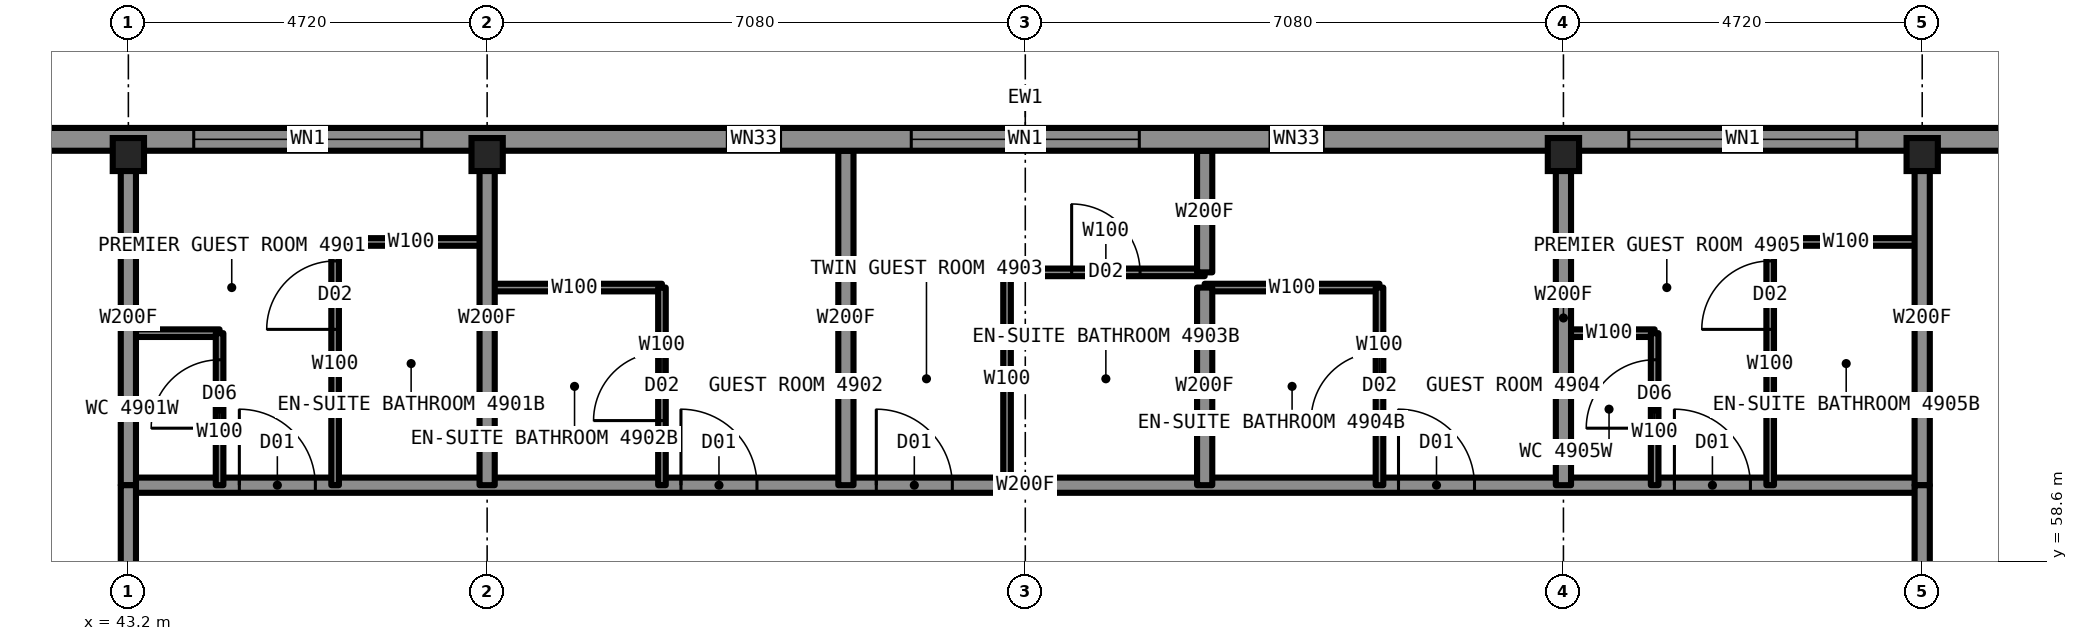
"""IFC4 building model, lengths in metres.
Left out: names, types, materials, properties, quantities, classifications, styles, units other than length and angle.
Written with IfcOpenShell. Run it as: python <this file> out.ifc"""

import sys

from ifc_helpers import new_model, si_unit, direction, frame, frame_2d, origin, origin_2d, place, context, subcontext, project, spatial, rectangle, i_section, extrude, element, fill, save


model = new_model("IFC4")
c1 = context("Model", 3, precision=1e-05, world=origin(), true_north=direction((0.0, 1.0)))
c2 = subcontext(c1, "Body", "Model", "MODEL_VIEW")
j1 = project(units=[si_unit("LENGTHUNIT", "METRE"), si_unit("PLANEANGLEUNIT", "RADIAN")], contexts=[c1])
p1 = place(None, origin())
s1 = spatial("IfcSite", under=j1, at=p1, CompositionType="ELEMENT")
p2 = place(p1, origin())
s2 = spatial("IfcBuilding", under=s1, at=p2, CompositionType="ELEMENT")
p3 = place(p2, frame((0.0, 0.0, 182.8)))
s3 = spatial("IfcBuildingStorey", under=s2, at=p3, CompositionType="ELEMENT", Elevation=182.8)
for number, where, z_axis, x_axis in (
    (1, (43.2, 63.95, 0.0), (0.0, 0.0, 1.0), (1.0, 0.0, 0.0)),
    (2, (47.92, 63.95, 0.0), (0.0, 0.0, 1.0), (1.0, 0.0, 0.0)),
    (3, (62.08, 63.95, 0.0), (0.0, 0.0, 1.0), (1.0, 0.0, 0.0)),
    (4, (66.8, 63.95, 0.0), (0.0, 0.0, 1.0), (1.0, 0.0, 0.0)),
):
    element("IfcColumn", number, at=place(p3, frame(where, z_axis=z_axis, x_axis=x_axis)), inside=s3, PredefinedType="COLUMN", context=c2, shape_type="SweptSolid", body=[
        extrude(i_section(OverallWidth=0.411, OverallDepth=0.434, WebThickness=0.036, FlangeThickness=0.057, at=origin_2d()), origin(), (0.0, 0.0, 1.0), 3.5),
    ])
p4 = place(p3, frame((43.2, 59.6, 0.0), z_axis=(0.0, 0.0, 1.0), x_axis=(1.0, 0.0, 0.0)))
e5 = element("IfcWall", 5, at=p4, inside=s3, PredefinedType="PARTITIONING", context=c2, shape_type="SweptSolid", body=[
    extrude(rectangle(XDim=23.6, YDim=0.2, at=frame_2d((11.8, 0.0))), origin(), (0.0, 0.0, 1.0), 3.33),
])
p5 = place(p4, frame((1.46, 0.0, 0.0)))
e6 = element("IfcOpeningElement", 6, at=p5, cuts=e5, PredefinedType="OPENING", context=c2, shape_type="SweptSolid", body=[
    extrude(rectangle(XDim=1.0, YDim=2.2, at=frame_2d((0.5, 1.1))), frame((0.0, 0.11, 0.0), z_axis=(0.0, -1.0, 0.0), x_axis=(1.0, 0.0, 0.0)), (0.0, 0.0, 1.0), 0.22),
])
p6 = place(p4, frame((7.27, 0.0, 0.0)))
e7 = element("IfcOpeningElement", 7, at=p6, cuts=e5, PredefinedType="OPENING", context=c2, shape_type="SweptSolid", body=[
    extrude(rectangle(XDim=1.0, YDim=2.2, at=frame_2d((0.5, 1.1))), frame((0.0, 0.11, 0.0), z_axis=(0.0, -1.0, 0.0), x_axis=(1.0, 0.0, 0.0)), (0.0, 0.0, 1.0), 0.22),
])
p7 = place(p4, frame((9.84, 0.0, 0.0)))
e8 = element("IfcOpeningElement", 8, at=p7, cuts=e5, PredefinedType="OPENING", context=c2, shape_type="SweptSolid", body=[
    extrude(rectangle(XDim=1.0, YDim=2.2, at=frame_2d((0.5, 1.1))), frame((0.0, 0.11, 0.0), z_axis=(0.0, -1.0, 0.0), x_axis=(1.0, 0.0, 0.0)), (0.0, 0.0, 1.0), 0.22),
])
p8 = place(p4, frame((16.71, 0.0, 0.0)))
e9 = element("IfcOpeningElement", 9, at=p8, cuts=e5, PredefinedType="OPENING", context=c2, shape_type="SweptSolid", body=[
    extrude(rectangle(XDim=1.0, YDim=2.2, at=frame_2d((0.5, 1.1))), frame((0.0, 0.11, 0.0), z_axis=(0.0, -1.0, 0.0), x_axis=(1.0, 0.0, 0.0)), (0.0, 0.0, 1.0), 0.22),
])
p9 = place(p4, frame((20.34, 0.0, 0.0)))
e10 = element("IfcOpeningElement", 10, at=p9, cuts=e5, PredefinedType="OPENING", context=c2, shape_type="SweptSolid", body=[
    extrude(rectangle(XDim=1.0, YDim=2.2, at=frame_2d((0.5, 1.1))), frame((0.0, 0.11, 0.0), z_axis=(0.0, -1.0, 0.0), x_axis=(1.0, 0.0, 0.0)), (0.0, 0.0, 1.0), 0.22),
])
for number, where, z_axis, x_axis in (
    (11, (43.2, 61.6, 0.0), (0.0, 0.0, 1.0), (1.0, 0.0, 0.0)),
    (12, (62.08, 61.6, 0.0), (0.0, 0.0, 1.0), (1.0, 0.0, 0.0)),
):
    element("IfcWall", number, at=place(p3, frame(where, z_axis=z_axis, x_axis=x_axis)), inside=s3, PredefinedType="PARTITIONING", context=c2, shape_type="SweptSolid", body=[
        extrude(rectangle(XDim=1.2, YDim=0.1, at=frame_2d((0.6, 0.0))), origin(), (0.0, 0.0, 1.0), 3.33),
    ])
p10 = place(p3, frame((47.92, 62.2, 0.0), z_axis=(0.0, 0.0, 1.0), x_axis=(1.0, 0.0, 0.0)))
e13 = element("IfcWall", 13, at=p10, inside=s3, PredefinedType="PARTITIONING", context=c2, shape_type="SweptSolid", body=[
    extrude(rectangle(XDim=2.3, YDim=0.1, at=frame_2d((1.15, 0.0))), origin(), (0.0, 0.0, 1.0), 3.33),
])
p11 = place(p3, frame((57.36, 62.2, 0.0), z_axis=(0.0, 0.0, 1.0), x_axis=(1.0, 0.0, 0.0)))
e14 = element("IfcWall", 14, at=p11, inside=s3, PredefinedType="PARTITIONING", context=c2, shape_type="SweptSolid", body=[
    extrude(rectangle(XDim=2.3, YDim=0.1, at=frame_2d((1.15, 0.0))), origin(), (0.0, 0.0, 1.0), 3.33),
])
p12 = place(p3, frame((54.76, 62.4, 0.0), z_axis=(0.0, 0.0, 1.0), x_axis=(1.0, 0.0, 0.0)))
e15 = element("IfcWall", 15, at=p12, inside=s3, PredefinedType="PARTITIONING", context=c2, shape_type="SweptSolid", body=[
    extrude(rectangle(XDim=2.6, YDim=0.1, at=frame_2d((1.3, 0.0))), origin(), (0.0, 0.0, 1.0), 3.33),
])
p13 = place(p12, frame((0.85, 0.0, 0.0)))
e16 = element("IfcOpeningElement", 16, at=p13, cuts=e15, PredefinedType="OPENING", context=c2, shape_type="SweptSolid", body=[
    extrude(rectangle(XDim=0.9, YDim=2.1, at=frame_2d((0.45, 1.05))), frame((0.0, 0.06, 0.0), z_axis=(0.0, -1.0, 0.0), x_axis=(1.0, 0.0, 0.0)), (0.0, 0.0, 1.0), 0.12),
])
for number, where, z_axis, x_axis in (
    (17, (45.92, 62.8, 0.0), (0.0, 0.0, 1.0), (1.0, 0.0, 0.0)),
    (18, (64.8, 62.8, 0.0), (0.0, 0.0, 1.0), (1.0, 0.0, 0.0)),
):
    element("IfcWall", number, at=place(p3, frame(where, z_axis=z_axis, x_axis=x_axis)), inside=s3, PredefinedType="PARTITIONING", context=c2, shape_type="SweptSolid", body=[
        extrude(rectangle(XDim=2.0, YDim=0.1, at=frame_2d((1.0, 0.0))), origin(), (0.0, 0.0, 1.0), 3.33),
    ])
p14 = place(p3, frame((54.76, 59.6, 0.0), z_axis=(0.0, 0.0, 1.0), x_axis=(0.0, 1.0, 0.0)))
e19 = element("IfcWall", 19, at=p14, inside=s3, PredefinedType="PARTITIONING", context=c2, shape_type="SweptSolid", body=[
    extrude(rectangle(XDim=2.8, YDim=0.1, at=frame_2d((1.4, 0.0))), origin(), (0.0, 0.0, 1.0), 3.33),
])
p15 = place(p3, frame((44.4, 59.6, 0.0), z_axis=(0.0, 0.0, 1.0), x_axis=(0.0, 1.0, 0.0)))
e20 = element("IfcWall", 20, at=p15, inside=s3, PredefinedType="PARTITIONING", context=c2, shape_type="SweptSolid", body=[
    extrude(rectangle(XDim=2.0, YDim=0.1, at=frame_2d((1.0, 0.0))), origin(), (0.0, 0.0, 1.0), 3.33),
])
p16 = place(p15, frame((0.75, 0.0, 0.0)))
e21 = element("IfcOpeningElement", 21, at=p16, cuts=e20, PredefinedType="OPENING", context=c2, shape_type="SweptSolid", body=[
    extrude(rectangle(XDim=0.9, YDim=2.1, at=frame_2d((0.45, 1.05))), frame((0.0, 0.06, 0.0), z_axis=(0.0, -1.0, 0.0), x_axis=(1.0, 0.0, 0.0)), (0.0, 0.0, 1.0), 0.12),
])
p17 = place(p3, frame((43.2, 59.6, 0.0), z_axis=(0.0, 0.0, 1.0), x_axis=(0.0, 1.0, 0.0)))
e22 = element("IfcWall", 22, at=p17, inside=s3, PredefinedType="PARTITIONING", context=c2, shape_type="SweptSolid", body=[
    extrude(rectangle(XDim=4.4, YDim=0.2, at=frame_2d((2.2, 0.0))), origin(), (0.0, 0.0, 1.0), 2.573),
])
p18 = place(p3, frame((52.64, 59.6, 0.0), z_axis=(0.0, 0.0, 1.0), x_axis=(0.0, 1.0, 0.0)))
e23 = element("IfcWall", 23, at=p18, inside=s3, PredefinedType="PARTITIONING", context=c2, shape_type="SweptSolid", body=[
    extrude(rectangle(XDim=4.4, YDim=0.2, at=frame_2d((2.2, 0.0))), origin(), (0.0, 0.0, 1.0), 3.33),
])
p19 = place(p3, frame((50.22, 59.6, 0.0), z_axis=(0.0, 0.0, 1.0), x_axis=(0.0, 1.0, 0.0)))
e24 = element("IfcWall", 24, at=p19, inside=s3, PredefinedType="PARTITIONING", context=c2, shape_type="SweptSolid", body=[
    extrude(rectangle(XDim=2.6, YDim=0.1, at=frame_2d((1.3, 0.0))), origin(), (0.0, 0.0, 1.0), 3.33),
])
p20 = place(p19, frame((0.85, 0.0, 0.0)))
e25 = element("IfcOpeningElement", 25, at=p20, cuts=e24, PredefinedType="OPENING", context=c2, shape_type="SweptSolid", body=[
    extrude(rectangle(XDim=0.9, YDim=2.1, at=frame_2d((0.45, 1.05))), frame((0.0, 0.06, 0.0), z_axis=(0.0, -1.0, 0.0), x_axis=(1.0, 0.0, 0.0)), (0.0, 0.0, 1.0), 0.12),
])
p21 = place(p3, frame((47.92, 59.6, 0.0), z_axis=(0.0, 0.0, 1.0), x_axis=(0.0, 1.0, 0.0)))
e26 = element("IfcWall", 26, at=p21, inside=s3, PredefinedType="PARTITIONING", context=c2, shape_type="SweptSolid", body=[
    extrude(rectangle(XDim=4.4, YDim=0.2, at=frame_2d((2.2, 0.0))), origin(), (0.0, 0.0, 1.0), 2.573),
])
p22 = place(p3, frame((45.92, 59.6, 0.0), z_axis=(0.0, 0.0, 1.0), x_axis=(0.0, 1.0, 0.0)))
e27 = element("IfcWall", 27, at=p22, inside=s3, PredefinedType="PARTITIONING", context=c2, shape_type="SweptSolid", body=[
    extrude(rectangle(XDim=3.2, YDim=0.1, at=frame_2d((1.6, 0.0))), origin(), (0.0, 0.0, 1.0), 3.33),
])
p23 = place(p22, frame((2.05, 0.0, 0.0)))
e28 = element("IfcOpeningElement", 28, at=p23, cuts=e27, PredefinedType="OPENING", context=c2, shape_type="SweptSolid", body=[
    extrude(rectangle(XDim=0.9, YDim=2.1, at=frame_2d((0.45, 1.05))), frame((0.0, 0.06, 0.0), z_axis=(0.0, -1.0, 0.0), x_axis=(1.0, 0.0, 0.0)), (0.0, 0.0, 1.0), 0.12),
])
p24 = place(p3, frame((66.8, 59.6, 0.0), z_axis=(0.0, 0.0, 1.0), x_axis=(0.0, 1.0, 0.0)))
e29 = element("IfcWall", 29, at=p24, inside=s3, PredefinedType="PARTITIONING", context=c2, shape_type="SweptSolid", body=[
    extrude(rectangle(XDim=4.4, YDim=0.2, at=frame_2d((2.2, 0.0))), origin(), (0.0, 0.0, 1.0), 2.573),
])
p25 = place(p3, frame((57.36, 59.6, 0.0), z_axis=(0.0, 0.0, 1.0), x_axis=(0.0, 1.0, 0.0)))
e30 = element("IfcWall", 30, at=p25, inside=s3, PredefinedType="PARTITIONING", context=c2, shape_type="SweptSolid", body=[
    extrude(rectangle(XDim=2.6, YDim=0.2, at=frame_2d((1.3, 0.0))), origin(), (0.0, 0.0, 1.0), 3.33),
])
p26 = place(p3, frame((57.36, 62.4, 0.0), z_axis=(0.0, 0.0, 1.0), x_axis=(0.0, 1.0, 0.0)))
e31 = element("IfcWall", 31, at=p26, inside=s3, PredefinedType="PARTITIONING", context=c2, shape_type="SweptSolid", body=[
    extrude(rectangle(XDim=1.6, YDim=0.2, at=frame_2d((0.8, 0.0))), origin(), (0.0, 0.0, 1.0), 3.33),
])
p27 = place(p3, frame((59.66, 59.6, 0.0), z_axis=(0.0, 0.0, 1.0), x_axis=(0.0, 1.0, 0.0)))
e32 = element("IfcWall", 32, at=p27, inside=s3, PredefinedType="PARTITIONING", context=c2, shape_type="SweptSolid", body=[
    extrude(rectangle(XDim=2.6, YDim=0.1, at=frame_2d((1.3, 0.0))), origin(), (0.0, 0.0, 1.0), 3.33),
])
p28 = place(p27, frame((0.85, 0.0, 0.0)))
e33 = element("IfcOpeningElement", 33, at=p28, cuts=e32, PredefinedType="OPENING", context=c2, shape_type="SweptSolid", body=[
    extrude(rectangle(XDim=0.9, YDim=2.1, at=frame_2d((0.45, 1.05))), frame((0.0, 0.06, 0.0), z_axis=(0.0, -1.0, 0.0), x_axis=(1.0, 0.0, 0.0)), (0.0, 0.0, 1.0), 0.12),
])
p29 = place(p3, frame((62.08, 59.6, 0.0), z_axis=(0.0, 0.0, 1.0), x_axis=(0.0, 1.0, 0.0)))
e34 = element("IfcWall", 34, at=p29, inside=s3, PredefinedType="PARTITIONING", context=c2, shape_type="SweptSolid", body=[
    extrude(rectangle(XDim=4.4, YDim=0.2, at=frame_2d((2.2, 0.0))), origin(), (0.0, 0.0, 1.0), 2.573),
])
p30 = place(p3, frame((63.28, 59.6, 0.0), z_axis=(0.0, 0.0, 1.0), x_axis=(0.0, 1.0, 0.0)))
e35 = element("IfcWall", 35, at=p30, inside=s3, PredefinedType="PARTITIONING", context=c2, shape_type="SweptSolid", body=[
    extrude(rectangle(XDim=2.0, YDim=0.1, at=frame_2d((1.0, 0.0))), origin(), (0.0, 0.0, 1.0), 3.33),
])
p31 = place(p30, frame((0.75, 0.0, 0.0)))
e36 = element("IfcOpeningElement", 36, at=p31, cuts=e35, PredefinedType="OPENING", context=c2, shape_type="SweptSolid", body=[
    extrude(rectangle(XDim=0.9, YDim=2.1, at=frame_2d((0.45, 1.05))), frame((0.0, 0.06, 0.0), z_axis=(0.0, -1.0, 0.0), x_axis=(1.0, 0.0, 0.0)), (0.0, 0.0, 1.0), 0.12),
])
p32 = place(p3, frame((64.8, 59.6, 0.0), z_axis=(0.0, 0.0, 1.0), x_axis=(0.0, 1.0, 0.0)))
e37 = element("IfcWall", 37, at=p32, inside=s3, PredefinedType="PARTITIONING", context=c2, shape_type="SweptSolid", body=[
    extrude(rectangle(XDim=3.2, YDim=0.1, at=frame_2d((1.6, 0.0))), origin(), (0.0, 0.0, 1.0), 3.33),
])
p33 = place(p32, frame((2.05, 0.0, 0.0)))
e38 = element("IfcOpeningElement", 38, at=p33, cuts=e37, PredefinedType="OPENING", context=c2, shape_type="SweptSolid", body=[
    extrude(rectangle(XDim=0.9, YDim=2.1, at=frame_2d((0.45, 1.05))), frame((0.0, 0.06, 0.0), z_axis=(0.0, -1.0, 0.0), x_axis=(1.0, 0.0, 0.0)), (0.0, 0.0, 1.0), 0.12),
])
p34 = place(p3, frame((68.8, 64.15, 0.0), z_axis=(0.0, 0.0, 1.0), x_axis=(-1.0, 0.0, 0.0)))
e39 = element("IfcWall", 39, at=p34, inside=s3, PredefinedType="SOLIDWALL", context=c2, shape_type="SweptSolid", body=[
    extrude(rectangle(XDim=27.6, YDim=0.3, at=frame_2d((13.8, 0.0))), origin(), (0.0, 0.0, 1.0), 2.83),
])
p35 = place(p34, frame((2.86, 0.0, 0.3)))
e40 = element("IfcOpeningElement", 40, at=p35, cuts=e39, PredefinedType="OPENING", context=c2, shape_type="SweptSolid", body=[
    extrude(rectangle(XDim=3.0, YDim=2.0, at=frame_2d((1.5, 1.0))), frame((0.0, 0.16, 0.0), z_axis=(0.0, -1.0, 0.0), x_axis=(1.0, 0.0, 0.0)), (0.0, 0.0, 1.0), 0.32),
])
p36 = place(p34, frame((9.88, 0.0, 0.3)))
e41 = element("IfcOpeningElement", 41, at=p36, cuts=e39, PredefinedType="OPENING", context=c2, shape_type="SweptSolid", body=[
    extrude(rectangle(XDim=0.7, YDim=1.1, at=frame_2d((0.35, 0.55))), frame((0.0, 0.16, 0.0), z_axis=(0.0, -1.0, 0.0), x_axis=(1.0, 0.0, 0.0)), (0.0, 0.0, 1.0), 0.32),
])
p37 = place(p34, frame((12.3, 0.0, 0.3)))
e42 = element("IfcOpeningElement", 42, at=p37, cuts=e39, PredefinedType="OPENING", context=c2, shape_type="SweptSolid", body=[
    extrude(rectangle(XDim=3.0, YDim=2.0, at=frame_2d((1.5, 1.0))), frame((0.0, 0.16, 0.0), z_axis=(0.0, -1.0, 0.0), x_axis=(1.0, 0.0, 0.0)), (0.0, 0.0, 1.0), 0.32),
])
p38 = place(p34, frame((17.02, 0.0, 0.3)))
e43 = element("IfcOpeningElement", 43, at=p38, cuts=e39, PredefinedType="OPENING", context=c2, shape_type="SweptSolid", body=[
    extrude(rectangle(XDim=0.7, YDim=1.1, at=frame_2d((0.35, 0.55))), frame((0.0, 0.16, 0.0), z_axis=(0.0, -1.0, 0.0), x_axis=(1.0, 0.0, 0.0)), (0.0, 0.0, 1.0), 0.32),
])
p39 = place(p34, frame((21.74, 0.0, 0.3)))
e44 = element("IfcOpeningElement", 44, at=p39, cuts=e39, PredefinedType="OPENING", context=c2, shape_type="SweptSolid", body=[
    extrude(rectangle(XDim=3.0, YDim=2.0, at=frame_2d((1.5, 1.0))), frame((0.0, 0.16, 0.0), z_axis=(0.0, -1.0, 0.0), x_axis=(1.0, 0.0, 0.0)), (0.0, 0.0, 1.0), 0.32),
])
for number, where, z_axis, x_axis in (
    (45, (43.2, 56.78, 0.0), (0.0, 0.0, 1.0), (0.0, 1.0, 0.0)),
    (46, (66.8, 56.78, 0.0), (0.0, 0.0, 1.0), (0.0, 1.0, 0.0)),
):
    element("IfcWall", number, at=place(p3, frame(where, z_axis=z_axis, x_axis=x_axis)), inside=s3, PredefinedType="PARTITIONING", context=c2, shape_type="SweptSolid", body=[
        extrude(rectangle(XDim=2.82, YDim=0.2, at=frame_2d((1.41, 0.0))), origin(), (0.0, 0.0, 1.0), 2.573),
    ])
p40 = place(p5, origin())
e47 = element("IfcDoor", 47, at=p40, inside=s3, OperationType="SINGLE_SWING_LEFT", PredefinedType="DOOR", context=c2, shape_type="SweptSolid", body=[
    extrude(rectangle(XDim=1.0, YDim=2.2, at=frame_2d((0.5, 1.1))), frame((0.0, 0.025, 0.0), z_axis=(0.0, -1.0, 0.0), x_axis=(1.0, 0.0, 0.0)), (0.0, 0.0, 1.0), 0.05),
])
fill(e6, e47)
p41 = place(p23, origin())
e48 = element("IfcDoor", 48, at=p41, inside=s3, OperationType="SINGLE_SWING_RIGHT", PredefinedType="DOOR", context=c2, shape_type="SweptSolid", body=[
    extrude(rectangle(XDim=0.9, YDim=2.1, at=frame_2d((0.45, 1.05))), frame((0.0, 0.025, 0.0), z_axis=(0.0, -1.0, 0.0), x_axis=(1.0, 0.0, 0.0)), (0.0, 0.0, 1.0), 0.05),
])
fill(e28, e48)
p42 = place(p16, origin())
e49 = element("IfcDoor", 49, at=p42, inside=s3, OperationType="SINGLE_SWING_LEFT", PredefinedType="DOOR", context=c2, shape_type="SweptSolid", body=[
    extrude(rectangle(XDim=0.9, YDim=2.1, at=frame_2d((0.45, 1.05))), frame((0.0, 0.025, 0.0), z_axis=(0.0, -1.0, 0.0), x_axis=(1.0, 0.0, 0.0)), (0.0, 0.0, 1.0), 0.05),
])
fill(e21, e49)
p43 = place(p6, origin())
e50 = element("IfcDoor", 50, at=p43, inside=s3, OperationType="SINGLE_SWING_LEFT", PredefinedType="DOOR", context=c2, shape_type="SweptSolid", body=[
    extrude(rectangle(XDim=1.0, YDim=2.2, at=frame_2d((0.5, 1.1))), frame((0.0, 0.025, 0.0), z_axis=(0.0, -1.0, 0.0), x_axis=(1.0, 0.0, 0.0)), (0.0, 0.0, 1.0), 0.05),
])
fill(e7, e50)
p44 = place(p20, origin())
e51 = element("IfcDoor", 51, at=p44, inside=s3, OperationType="SINGLE_SWING_RIGHT", PredefinedType="DOOR", context=c2, shape_type="SweptSolid", body=[
    extrude(rectangle(XDim=0.9, YDim=2.1, at=frame_2d((0.45, 1.05))), frame((0.0, 0.025, 0.0), z_axis=(0.0, -1.0, 0.0), x_axis=(1.0, 0.0, 0.0)), (0.0, 0.0, 1.0), 0.05),
])
fill(e25, e51)
p45 = place(p7, origin())
e52 = element("IfcDoor", 52, at=p45, inside=s3, OperationType="SINGLE_SWING_LEFT", PredefinedType="DOOR", context=c2, shape_type="SweptSolid", body=[
    extrude(rectangle(XDim=1.0, YDim=2.2, at=frame_2d((0.5, 1.1))), frame((0.0, 0.025, 0.0), z_axis=(0.0, -1.0, 0.0), x_axis=(1.0, 0.0, 0.0)), (0.0, 0.0, 1.0), 0.05),
])
fill(e8, e52)
p46 = place(p13, origin())
e53 = element("IfcDoor", 53, at=p46, inside=s3, OperationType="SINGLE_SWING_RIGHT", PredefinedType="DOOR", context=c2, shape_type="SweptSolid", body=[
    extrude(rectangle(XDim=0.9, YDim=2.1, at=frame_2d((0.45, 1.05))), frame((0.0, 0.025, 0.0), z_axis=(0.0, -1.0, 0.0), x_axis=(1.0, 0.0, 0.0)), (0.0, 0.0, 1.0), 0.05),
])
fill(e16, e53)
p47 = place(p8, origin())
e54 = element("IfcDoor", 54, at=p47, inside=s3, OperationType="SINGLE_SWING_LEFT", PredefinedType="DOOR", context=c2, shape_type="SweptSolid", body=[
    extrude(rectangle(XDim=1.0, YDim=2.2, at=frame_2d((0.5, 1.1))), frame((0.0, 0.025, 0.0), z_axis=(0.0, -1.0, 0.0), x_axis=(1.0, 0.0, 0.0)), (0.0, 0.0, 1.0), 0.05),
])
fill(e9, e54)
p48 = place(p28, origin())
e55 = element("IfcDoor", 55, at=p48, inside=s3, OperationType="SINGLE_SWING_RIGHT", PredefinedType="DOOR", context=c2, shape_type="SweptSolid", body=[
    extrude(rectangle(XDim=0.9, YDim=2.1, at=frame_2d((0.45, 1.05))), frame((0.0, 0.025, 0.0), z_axis=(0.0, -1.0, 0.0), x_axis=(1.0, 0.0, 0.0)), (0.0, 0.0, 1.0), 0.05),
])
fill(e33, e55)
p49 = place(p9, origin())
e56 = element("IfcDoor", 56, at=p49, inside=s3, OperationType="SINGLE_SWING_LEFT", PredefinedType="DOOR", context=c2, shape_type="SweptSolid", body=[
    extrude(rectangle(XDim=1.0, YDim=2.2, at=frame_2d((0.5, 1.1))), frame((0.0, 0.025, 0.0), z_axis=(0.0, -1.0, 0.0), x_axis=(1.0, 0.0, 0.0)), (0.0, 0.0, 1.0), 0.05),
])
fill(e10, e56)
p50 = place(p33, origin())
e57 = element("IfcDoor", 57, at=p50, inside=s3, OperationType="SINGLE_SWING_RIGHT", PredefinedType="DOOR", context=c2, shape_type="SweptSolid", body=[
    extrude(rectangle(XDim=0.9, YDim=2.1, at=frame_2d((0.45, 1.05))), frame((0.0, 0.025, 0.0), z_axis=(0.0, -1.0, 0.0), x_axis=(1.0, 0.0, 0.0)), (0.0, 0.0, 1.0), 0.05),
])
fill(e38, e57)
p51 = place(p31, origin())
e58 = element("IfcDoor", 58, at=p51, inside=s3, OperationType="SINGLE_SWING_LEFT", PredefinedType="DOOR", context=c2, shape_type="SweptSolid", body=[
    extrude(rectangle(XDim=0.9, YDim=2.1, at=frame_2d((0.45, 1.05))), frame((0.0, 0.025, 0.0), z_axis=(0.0, -1.0, 0.0), x_axis=(1.0, 0.0, 0.0)), (0.0, 0.0, 1.0), 0.05),
])
fill(e36, e58)
p52 = place(p35, origin())
e59 = element("IfcWindow", 59, at=p52, inside=s3, PartitioningType="SINGLE_PANEL", PredefinedType="WINDOW", context=c2, shape_type="SweptSolid", body=[
    extrude(rectangle(XDim=3.0, YDim=2.0, at=frame_2d((1.5, 1.0))), frame((0.0, 0.13, 0.0), z_axis=(0.0, -1.0, 0.0), x_axis=(1.0, 0.0, 0.0)), (0.0, 0.0, 1.0), 0.06),
])
fill(e40, e59)
p53 = place(p36, origin())
e60 = element("IfcWindow", 60, at=p53, inside=s3, PartitioningType="SINGLE_PANEL", PredefinedType="WINDOW", context=c2, shape_type="SweptSolid", body=[
    extrude(rectangle(XDim=0.7, YDim=1.1, at=frame_2d((0.35, 0.55))), frame((0.0, 0.13, 0.0), z_axis=(0.0, -1.0, 0.0), x_axis=(1.0, 0.0, 0.0)), (0.0, 0.0, 1.0), 0.06),
])
fill(e41, e60)
p54 = place(p37, origin())
e61 = element("IfcWindow", 61, at=p54, inside=s3, PartitioningType="SINGLE_PANEL", PredefinedType="WINDOW", context=c2, shape_type="SweptSolid", body=[
    extrude(rectangle(XDim=3.0, YDim=2.0, at=frame_2d((1.5, 1.0))), frame((0.0, 0.13, 0.0), z_axis=(0.0, -1.0, 0.0), x_axis=(1.0, 0.0, 0.0)), (0.0, 0.0, 1.0), 0.06),
])
fill(e42, e61)
p55 = place(p38, origin())
e62 = element("IfcWindow", 62, at=p55, inside=s3, PartitioningType="SINGLE_PANEL", PredefinedType="WINDOW", context=c2, shape_type="SweptSolid", body=[
    extrude(rectangle(XDim=0.7, YDim=1.1, at=frame_2d((0.35, 0.55))), frame((0.0, 0.13, 0.0), z_axis=(0.0, -1.0, 0.0), x_axis=(1.0, 0.0, 0.0)), (0.0, 0.0, 1.0), 0.06),
])
fill(e43, e62)
p56 = place(p39, origin())
e63 = element("IfcWindow", 63, at=p56, inside=s3, PartitioningType="SINGLE_PANEL", PredefinedType="WINDOW", context=c2, shape_type="SweptSolid", body=[
    extrude(rectangle(XDim=3.0, YDim=2.0, at=frame_2d((1.5, 1.0))), frame((0.0, 0.13, 0.0), z_axis=(0.0, -1.0, 0.0), x_axis=(1.0, 0.0, 0.0)), (0.0, 0.0, 1.0), 0.06),
])
fill(e44, e63)
save(model, sys.argv[1])
